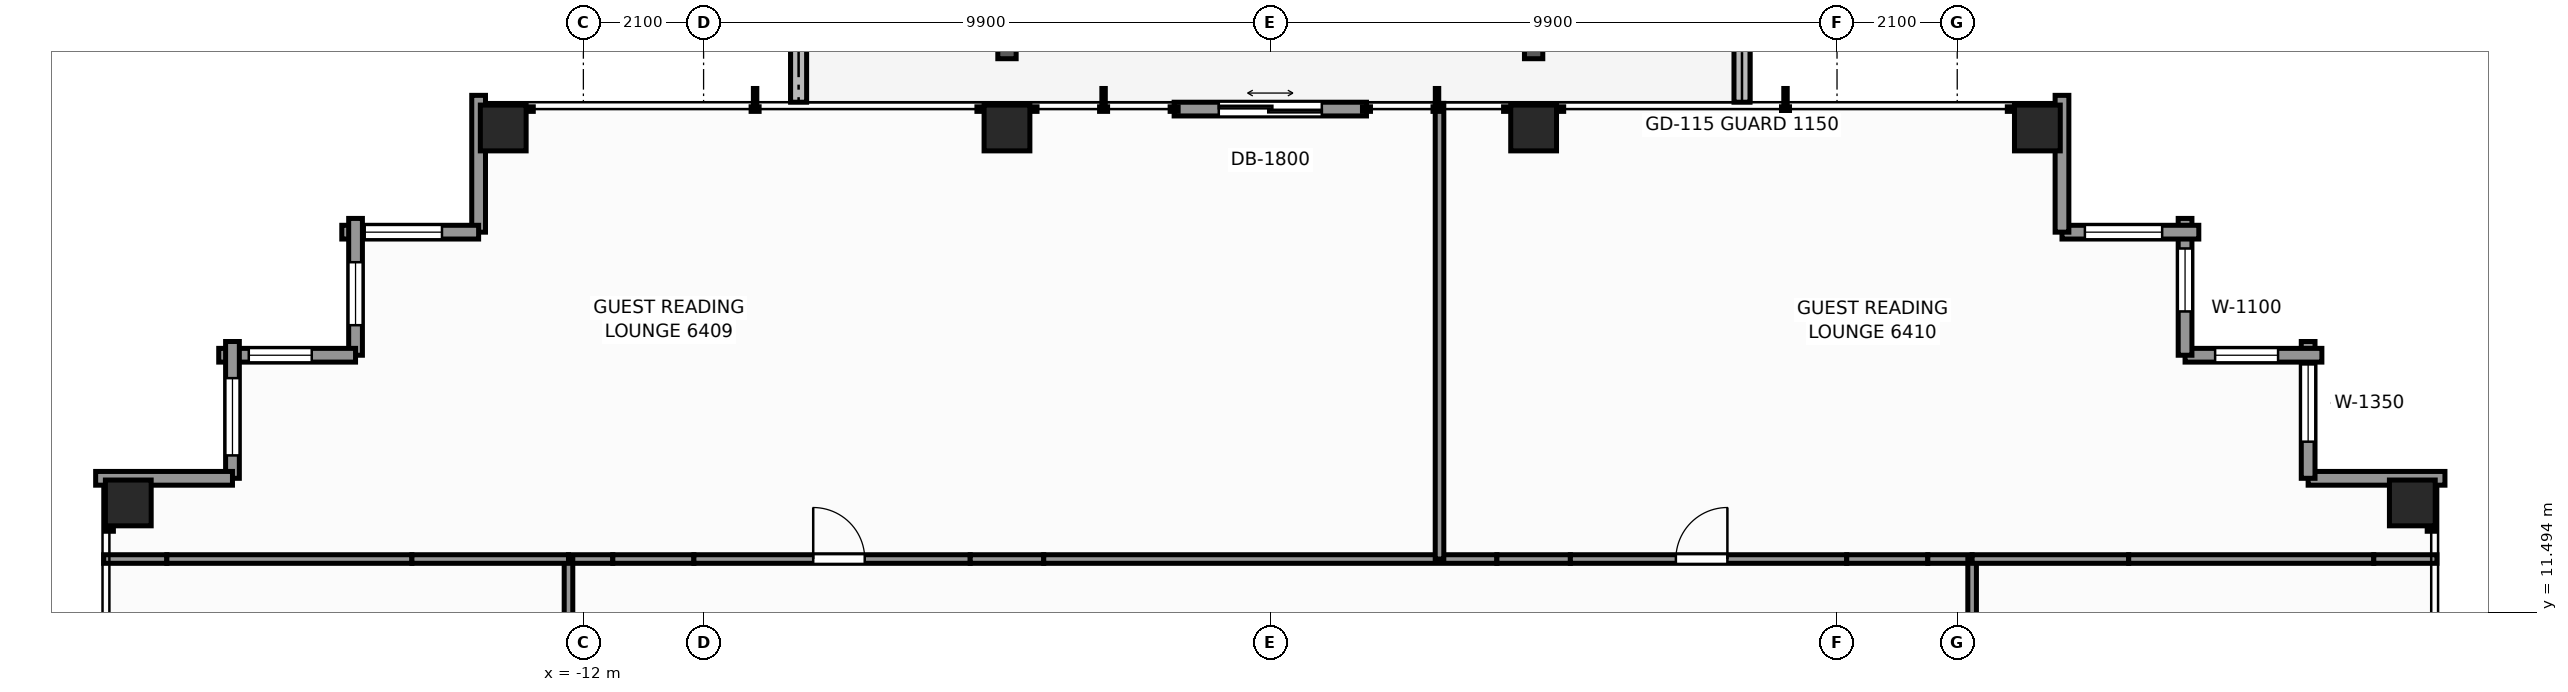
"""IFC4 building model, lengths in metres.
Left out: names, types, materials, properties, quantities, classifications, styles, units other than length and angle.
Written with IfcOpenShell. Run it as: python <this file> out.ifc"""

import sys

from ifc_helpers import new_model, si_unit, direction, frame, frame_2d, origin, origin_2d, place, context, subcontext, project, spatial, rectangle, extrude, element, fill, save


model = new_model("IFC4")
c1 = context("Model", 3, precision=1e-05, world=origin(), true_north=direction((0.0, 1.0)))
c2 = subcontext(c1, "Body", "Model", "MODEL_VIEW")
j1 = project(units=[si_unit("LENGTHUNIT", "METRE"), si_unit("PLANEANGLEUNIT", "RADIAN")], contexts=[c1])
p1 = place(None, origin())
s1 = spatial("IfcSite", under=j1, at=p1, CompositionType="ELEMENT")
p2 = place(p1, origin())
s2 = spatial("IfcBuilding", under=s1, at=p2, CompositionType="ELEMENT")
p3 = place(p2, frame((0.0, 0.0, 219.6)))
s3 = spatial("IfcBuildingStorey", under=s2, at=p3, CompositionType="ELEMENT", Elevation=219.6)
for number, where, z_axis, x_axis in (
    (1, (-13.4, 19.95, 0.0), (0.0, 0.0, 1.0), (1.0, 0.0, 0.0)),
    (2, (-4.6, 19.95, 0.0), (0.0, 0.0, 1.0), (1.0, 0.0, 0.0)),
    (3, (4.6, 19.95, 0.0), (0.0, 0.0, 1.0), (1.0, 0.0, 0.0)),
    (4, (13.4, 19.95, 0.0), (0.0, 0.0, 1.0), (1.0, 0.0, 0.0)),
    (5, (-19.95, 13.4, 0.0), (0.0, 0.0, 1.0), (1.0, 0.0, 0.0)),
    (6, (19.95, 13.4, 0.0), (0.0, 0.0, 1.0), (1.0, 0.0, 0.0)),
):
    element("IfcColumn", number, at=place(p3, frame(where, z_axis=z_axis, x_axis=x_axis)), inside=s3, PredefinedType="COLUMN", context=c2, shape_type="SweptSolid", body=[
        extrude(rectangle(XDim=0.8, YDim=0.8, at=origin_2d()), origin(), (0.0, 0.0, 1.0), 3.3),
    ])
p4 = place(p3, frame((8.24, 20.4, -0.04), z_axis=(0.0, 0.0, 1.0), x_axis=(0.0, 1.0, 0.0)))
e7 = element("IfcWall", 7, at=p4, inside=s3, PredefinedType="PARAPET", context=c2, shape_type="SweptSolid", body=[
    extrude(rectangle(XDim=1.705, YDim=0.28, at=frame_2d((0.853, 0.0))), origin(), (0.0, 0.0, 1.0), 0.42),
])
p5 = place(p3, frame((-8.24, 21.713, -0.04), z_axis=(0.0, 0.0, 1.0), x_axis=(0.0, -1.0, 0.0)))
e8 = element("IfcWall", 8, at=p5, inside=s3, PredefinedType="PARAPET", context=c2, shape_type="SweptSolid", body=[
    extrude(rectangle(XDim=1.313, YDim=0.28, at=frame_2d((0.656, 0.0))), origin(), (0.0, 0.0, 1.0), 0.42),
])
p6 = place(p3, frame((18.13, 13.83, 0.0), z_axis=(0.0, 0.0, 1.0), x_axis=(1.0, 0.0, 0.0)))
e9 = element("IfcWall", 9, at=p6, inside=s3, PredefinedType="STANDARD", context=c2, shape_type="SweptSolid", body=[
    extrude(rectangle(XDim=2.39, YDim=0.24, at=frame_2d((1.195, 0.0))), origin(), (0.0, 0.0, 1.0), 1.275),
])
p7 = place(p3, frame((18.13, 16.22, 0.0), z_axis=(0.0, 0.0, 1.0), x_axis=(0.0, -1.0, 0.0)))
e10 = element("IfcWall", 10, at=p7, inside=s3, PredefinedType="STANDARD", context=c2, shape_type="SweptSolid", body=[
    extrude(rectangle(XDim=2.39, YDim=0.24, at=frame_2d((1.195, 0.0))), origin(), (0.0, 0.0, 1.0), 2.463),
])
p8 = place(p7, frame((0.4, 0.0, 0.65)))
e11 = element("IfcOpeningElement", 11, at=p8, cuts=e10, PredefinedType="OPENING", context=c2, shape_type="SweptSolid", body=[
    extrude(rectangle(XDim=1.35, YDim=1.55, at=frame_2d((0.675, 0.775))), frame((0.0, 0.13, 0.0), z_axis=(0.0, -1.0, 0.0), x_axis=(1.0, 0.0, 0.0)), (0.0, 0.0, 1.0), 0.26),
])
p9 = place(p3, frame((15.98, 15.98, 0.0), z_axis=(0.0, 0.0, 1.0), x_axis=(1.0, 0.0, 0.0)))
e12 = element("IfcWall", 12, at=p9, inside=s3, PredefinedType="STANDARD", context=c2, shape_type="SweptSolid", body=[
    extrude(rectangle(XDim=2.39, YDim=0.24, at=frame_2d((1.195, 0.0))), origin(), (0.0, 0.0, 1.0), 2.463),
])
p10 = place(p9, frame((0.525, 0.0, 0.65)))
e13 = element("IfcOpeningElement", 13, at=p10, cuts=e12, PredefinedType="OPENING", context=c2, shape_type="SweptSolid", body=[
    extrude(rectangle(XDim=1.1, YDim=1.45, at=frame_2d((0.55, 0.725))), frame((0.0, 0.13, 0.0), z_axis=(0.0, -1.0, 0.0), x_axis=(1.0, 0.0, 0.0)), (0.0, 0.0, 1.0), 0.26),
])
p11 = place(p3, frame((15.98, 18.37, 0.0), z_axis=(0.0, 0.0, 1.0), x_axis=(0.0, -1.0, 0.0)))
e14 = element("IfcWall", 14, at=p11, inside=s3, PredefinedType="STANDARD", context=c2, shape_type="SweptSolid", body=[
    extrude(rectangle(XDim=2.39, YDim=0.24, at=frame_2d((1.195, 0.0))), origin(), (0.0, 0.0, 1.0), 2.463),
])
p12 = place(p11, frame((0.525, 0.0, 0.65)))
e15 = element("IfcOpeningElement", 15, at=p12, cuts=e14, PredefinedType="OPENING", context=c2, shape_type="SweptSolid", body=[
    extrude(rectangle(XDim=1.1, YDim=1.45, at=frame_2d((0.55, 0.725))), frame((0.0, 0.13, 0.0), z_axis=(0.0, -1.0, 0.0), x_axis=(1.0, 0.0, 0.0)), (0.0, 0.0, 1.0), 0.26),
])
p13 = place(p3, frame((13.83, 18.13, 0.0), z_axis=(0.0, 0.0, 1.0), x_axis=(1.0, 0.0, 0.0)))
e16 = element("IfcWall", 16, at=p13, inside=s3, PredefinedType="STANDARD", context=c2, shape_type="SweptSolid", body=[
    extrude(rectangle(XDim=2.39, YDim=0.24, at=frame_2d((1.195, 0.0))), origin(), (0.0, 0.0, 1.0), 2.463),
])
p14 = place(p13, frame((0.4, 0.0, 0.65)))
e17 = element("IfcOpeningElement", 17, at=p14, cuts=e16, PredefinedType="OPENING", context=c2, shape_type="SweptSolid", body=[
    extrude(rectangle(XDim=1.35, YDim=1.55, at=frame_2d((0.675, 0.775))), frame((0.0, 0.13, 0.0), z_axis=(0.0, -1.0, 0.0), x_axis=(1.0, 0.0, 0.0)), (0.0, 0.0, 1.0), 0.26),
])
p15 = place(p3, frame((13.83, 20.52, 0.0), z_axis=(0.0, 0.0, 1.0), x_axis=(0.0, -1.0, 0.0)))
e18 = element("IfcWall", 18, at=p15, inside=s3, PredefinedType="STANDARD", context=c2, shape_type="SweptSolid", body=[
    extrude(rectangle(XDim=2.39, YDim=0.24, at=frame_2d((1.195, 0.0))), origin(), (0.0, 0.0, 1.0), 1.275),
])
p16 = place(p3, frame((-1.68, 20.28, 0.0), z_axis=(0.0, 0.0, 1.0), x_axis=(1.0, 0.0, 0.0)))
e19 = element("IfcWall", 19, at=p16, inside=s3, PredefinedType="STANDARD", context=c2, shape_type="SweptSolid", body=[
    extrude(rectangle(XDim=3.36, YDim=0.24, at=frame_2d((1.68, 0.0))), origin(), (0.0, 0.0, 1.0), 3.08),
])
p17 = place(p16, frame((0.78, 0.0, 0.0)))
e20 = element("IfcOpeningElement", 20, at=p17, cuts=e19, PredefinedType="OPENING", context=c2, shape_type="SweptSolid", body=[
    extrude(rectangle(XDim=1.8, YDim=2.2, at=frame_2d((0.9, 1.1))), frame((0.0, 0.13, 0.0), z_axis=(0.0, -1.0, 0.0), x_axis=(1.0, 0.0, 0.0)), (0.0, 0.0, 1.0), 0.26),
])
p18 = place(p3, frame((-13.83, 18.13, 0.0), z_axis=(0.0, 0.0, 1.0), x_axis=(0.0, 1.0, 0.0)))
e21 = element("IfcWall", 21, at=p18, inside=s3, PredefinedType="STANDARD", context=c2, shape_type="SweptSolid", body=[
    extrude(rectangle(XDim=2.39, YDim=0.24, at=frame_2d((1.195, 0.0))), origin(), (0.0, 0.0, 1.0), 1.275),
])
p19 = place(p3, frame((-16.22, 18.13, 0.0), z_axis=(0.0, 0.0, 1.0), x_axis=(1.0, 0.0, 0.0)))
e22 = element("IfcWall", 22, at=p19, inside=s3, PredefinedType="STANDARD", context=c2, shape_type="SweptSolid", body=[
    extrude(rectangle(XDim=2.39, YDim=0.24, at=frame_2d((1.195, 0.0))), origin(), (0.0, 0.0, 1.0), 2.463),
])
p20 = place(p19, frame((0.4, 0.0, 0.65)))
e23 = element("IfcOpeningElement", 23, at=p20, cuts=e22, PredefinedType="OPENING", context=c2, shape_type="SweptSolid", body=[
    extrude(rectangle(XDim=1.35, YDim=1.55, at=frame_2d((0.675, 0.775))), frame((0.0, 0.13, 0.0), z_axis=(0.0, -1.0, 0.0), x_axis=(1.0, 0.0, 0.0)), (0.0, 0.0, 1.0), 0.26),
])
p21 = place(p3, frame((-15.98, 15.98, 0.0), z_axis=(0.0, 0.0, 1.0), x_axis=(0.0, 1.0, 0.0)))
e24 = element("IfcWall", 24, at=p21, inside=s3, PredefinedType="STANDARD", context=c2, shape_type="SweptSolid", body=[
    extrude(rectangle(XDim=2.39, YDim=0.24, at=frame_2d((1.195, 0.0))), origin(), (0.0, 0.0, 1.0), 2.463),
])
p22 = place(p21, frame((0.525, 0.0, 0.65)))
e25 = element("IfcOpeningElement", 25, at=p22, cuts=e24, PredefinedType="OPENING", context=c2, shape_type="SweptSolid", body=[
    extrude(rectangle(XDim=1.1, YDim=1.45, at=frame_2d((0.55, 0.725))), frame((0.0, 0.13, 0.0), z_axis=(0.0, -1.0, 0.0), x_axis=(1.0, 0.0, 0.0)), (0.0, 0.0, 1.0), 0.26),
])
p23 = place(p3, frame((-18.37, 15.98, 0.0), z_axis=(0.0, 0.0, 1.0), x_axis=(1.0, 0.0, 0.0)))
e26 = element("IfcWall", 26, at=p23, inside=s3, PredefinedType="STANDARD", context=c2, shape_type="SweptSolid", body=[
    extrude(rectangle(XDim=2.39, YDim=0.24, at=frame_2d((1.195, 0.0))), origin(), (0.0, 0.0, 1.0), 2.463),
])
p24 = place(p23, frame((0.525, 0.0, 0.65)))
e27 = element("IfcOpeningElement", 27, at=p24, cuts=e26, PredefinedType="OPENING", context=c2, shape_type="SweptSolid", body=[
    extrude(rectangle(XDim=1.1, YDim=1.45, at=frame_2d((0.55, 0.725))), frame((0.0, 0.13, 0.0), z_axis=(0.0, -1.0, 0.0), x_axis=(1.0, 0.0, 0.0)), (0.0, 0.0, 1.0), 0.26),
])
p25 = place(p3, frame((-18.13, 13.83, 0.0), z_axis=(0.0, 0.0, 1.0), x_axis=(0.0, 1.0, 0.0)))
e28 = element("IfcWall", 28, at=p25, inside=s3, PredefinedType="STANDARD", context=c2, shape_type="SweptSolid", body=[
    extrude(rectangle(XDim=2.39, YDim=0.24, at=frame_2d((1.195, 0.0))), origin(), (0.0, 0.0, 1.0), 2.463),
])
p26 = place(p25, frame((0.4, 0.0, 0.65)))
e29 = element("IfcOpeningElement", 29, at=p26, cuts=e28, PredefinedType="OPENING", context=c2, shape_type="SweptSolid", body=[
    extrude(rectangle(XDim=1.35, YDim=1.55, at=frame_2d((0.675, 0.775))), frame((0.0, 0.13, 0.0), z_axis=(0.0, -1.0, 0.0), x_axis=(1.0, 0.0, 0.0)), (0.0, 0.0, 1.0), 0.26),
])
p27 = place(p3, frame((-20.52, 13.83, 0.0), z_axis=(0.0, 0.0, 1.0), x_axis=(1.0, 0.0, 0.0)))
e30 = element("IfcWall", 30, at=p27, inside=s3, PredefinedType="STANDARD", context=c2, shape_type="SweptSolid", body=[
    extrude(rectangle(XDim=2.39, YDim=0.24, at=frame_2d((1.195, 0.0))), origin(), (0.0, 0.0, 1.0), 1.275),
])
p28 = place(p3, frame((-12.26, 12.42, 0.0), z_axis=(0.0, 0.0, 1.0), x_axis=(1.0, 0.0, 0.0)))
e31 = element("IfcWall", 31, at=p28, inside=s3, PredefinedType="PARTITIONING", context=c2, shape_type="SweptSolid", body=[
    extrude(rectangle(XDim=0.774, YDim=0.15, at=frame_2d((0.387, 0.0))), origin(), (0.0, 0.0, 1.0), 3.08),
])
p29 = place(p3, frame((-11.486, 12.42, 0.0), z_axis=(0.0, 0.0, 1.0), x_axis=(1.0, 0.0, 0.0)))
e32 = element("IfcWall", 32, at=p29, inside=s3, PredefinedType="PARTITIONING", context=c2, shape_type="SweptSolid", body=[
    extrude(rectangle(XDim=1.417, YDim=0.15, at=frame_2d((0.708, 0.0))), origin(), (0.0, 0.0, 1.0), 1.265),
])
p30 = place(p3, frame((-10.069, 12.42, 0.0), z_axis=(0.0, 0.0, 1.0), x_axis=(1.0, 0.0, 0.0)))
e33 = element("IfcWall", 33, at=p30, inside=s3, PredefinedType="PARTITIONING", context=c2, shape_type="SweptSolid", body=[
    extrude(rectangle(XDim=4.827, YDim=0.15, at=frame_2d((2.414, 0.0))), origin(), (0.0, 0.0, 1.0), 3.08),
])
p31 = place(p30, frame((2.084, 0.0, 0.0)))
e34 = element("IfcOpeningElement", 34, at=p31, cuts=e33, PredefinedType="OPENING", context=c2, shape_type="SweptSolid", body=[
    extrude(rectangle(XDim=0.9, YDim=2.06, at=frame_2d((0.45, 1.03))), frame((0.0, 0.085, 0.0), z_axis=(0.0, -1.0, 0.0), x_axis=(1.0, 0.0, 0.0)), (0.0, 0.0, 1.0), 0.17),
])
p32 = place(p3, frame((-5.242, 12.42, 0.0), z_axis=(0.0, 0.0, 1.0), x_axis=(1.0, 0.0, 0.0)))
e35 = element("IfcWall", 35, at=p32, inside=s3, PredefinedType="PARTITIONING", context=c2, shape_type="SweptSolid", body=[
    extrude(rectangle(XDim=1.284, YDim=0.15, at=frame_2d((0.642, 0.0))), origin(), (0.0, 0.0, 1.0), 1.265),
])
p33 = place(p3, frame((-3.958, 12.42, 0.0), z_axis=(0.0, 0.0, 1.0), x_axis=(1.0, 0.0, 0.0)))
e36 = element("IfcWall", 36, at=p33, inside=s3, PredefinedType="PARTITIONING", context=c2, shape_type="SweptSolid", body=[
    extrude(rectangle(XDim=7.916, YDim=0.15, at=frame_2d((3.958, 0.0))), origin(), (0.0, 0.0, 1.0), 2.605),
])
p34 = place(p3, frame((3.958, 12.42, 0.0), z_axis=(0.0, 0.0, 1.0), x_axis=(1.0, 0.0, 0.0)))
e37 = element("IfcWall", 37, at=p34, inside=s3, PredefinedType="PARTITIONING", context=c2, shape_type="SweptSolid", body=[
    extrude(rectangle(XDim=1.284, YDim=0.15, at=frame_2d((0.642, 0.0))), origin(), (0.0, 0.0, 1.0), 1.265),
])
p35 = place(p3, frame((5.242, 12.42, 0.0), z_axis=(0.0, 0.0, 1.0), x_axis=(1.0, 0.0, 0.0)))
e38 = element("IfcWall", 38, at=p35, inside=s3, PredefinedType="PARTITIONING", context=c2, shape_type="SweptSolid", body=[
    extrude(rectangle(XDim=4.827, YDim=0.15, at=frame_2d((2.414, 0.0))), origin(), (0.0, 0.0, 1.0), 3.08),
])
p36 = place(p35, frame((1.843, 0.0, 0.0)))
e39 = element("IfcOpeningElement", 39, at=p36, cuts=e38, PredefinedType="OPENING", context=c2, shape_type="SweptSolid", body=[
    extrude(rectangle(XDim=0.9, YDim=2.06, at=frame_2d((0.45, 1.03))), frame((0.0, 0.085, 0.0), z_axis=(0.0, -1.0, 0.0), x_axis=(1.0, 0.0, 0.0)), (0.0, 0.0, 1.0), 0.17),
])
p37 = place(p3, frame((10.069, 12.42, 0.0), z_axis=(0.0, 0.0, 1.0), x_axis=(1.0, 0.0, 0.0)))
e40 = element("IfcWall", 40, at=p37, inside=s3, PredefinedType="PARTITIONING", context=c2, shape_type="SweptSolid", body=[
    extrude(rectangle(XDim=1.417, YDim=0.15, at=frame_2d((0.708, 0.0))), origin(), (0.0, 0.0, 1.0), 1.265),
])
p38 = place(p3, frame((11.486, 12.42, 0.0), z_axis=(0.0, 0.0, 1.0), x_axis=(1.0, 0.0, 0.0)))
e41 = element("IfcWall", 41, at=p38, inside=s3, PredefinedType="PARTITIONING", context=c2, shape_type="SweptSolid", body=[
    extrude(rectangle(XDim=0.774, YDim=0.15, at=frame_2d((0.387, 0.0))), origin(), (0.0, 0.0, 1.0), 3.08),
])
for number, where, z_axis, x_axis in (
    (42, (-12.26, 11.43, 0.0), (0.0, 0.0, 1.0), (0.0, 1.0, 0.0)),
    (43, (12.26, 11.43, 0.0), (0.0, 0.0, 1.0), (0.0, 1.0, 0.0)),
):
    element("IfcWall", number, at=place(p3, frame(where, z_axis=z_axis, x_axis=x_axis)), inside=s3, PredefinedType="PARTITIONING", context=c2, shape_type="SweptSolid", body=[
        extrude(rectangle(XDim=0.99, YDim=0.15, at=frame_2d((0.495, 0.0))), origin(), (0.0, 0.0, 1.0), 3.08),
    ])
p39 = place(p3, frame((-20.38, 12.42, 0.0), z_axis=(0.0, 0.0, 1.0), x_axis=(1.0, 0.0, 0.0)))
e44 = element("IfcWall", 44, at=p39, inside=s3, PredefinedType="PARTITIONING", context=c2, shape_type="SweptSolid", body=[
    extrude(rectangle(XDim=1.103, YDim=0.15, at=frame_2d((0.552, 0.0))), origin(), (0.0, 0.0, 1.0), 2.453),
])
p40 = place(p3, frame((-19.277, 12.42, 0.0), z_axis=(0.0, 0.0, 1.0), x_axis=(1.0, 0.0, 0.0)))
e45 = element("IfcWall", 45, at=p40, inside=s3, PredefinedType="PARTITIONING", context=c2, shape_type="SweptSolid", body=[
    extrude(rectangle(XDim=4.281, YDim=0.15, at=frame_2d((2.141, 0.0))), origin(), (0.0, 0.0, 1.0), 1.265),
])
for number, where, z_axis, x_axis in (
    (46, (-14.995, 12.42, 0.0), (0.0, 0.0, 1.0), (1.0, 0.0, 0.0)),
    (47, (12.26, 12.42, 0.0), (0.0, 0.0, 1.0), (1.0, 0.0, 0.0)),
):
    element("IfcWall", number, at=place(p3, frame(where, z_axis=z_axis, x_axis=x_axis)), inside=s3, PredefinedType="PARTITIONING", context=c2, shape_type="SweptSolid", body=[
        extrude(rectangle(XDim=2.735, YDim=0.15, at=frame_2d((1.368, 0.0))), origin(), (0.0, 0.0, 1.0), 3.08),
    ])
p41 = place(p3, frame((14.995, 12.42, 0.0), z_axis=(0.0, 0.0, 1.0), x_axis=(1.0, 0.0, 0.0)))
e48 = element("IfcWall", 48, at=p41, inside=s3, PredefinedType="PARTITIONING", context=c2, shape_type="SweptSolid", body=[
    extrude(rectangle(XDim=4.281, YDim=0.15, at=frame_2d((2.141, 0.0))), origin(), (0.0, 0.0, 1.0), 1.265),
])
p42 = place(p3, frame((19.277, 12.42, 0.0), z_axis=(0.0, 0.0, 1.0), x_axis=(1.0, 0.0, 0.0)))
e49 = element("IfcWall", 49, at=p42, inside=s3, PredefinedType="PARTITIONING", context=c2, shape_type="SweptSolid", body=[
    extrude(rectangle(XDim=1.103, YDim=0.15, at=frame_2d((0.552, 0.0))), origin(), (0.0, 0.0, 1.0), 2.453),
])
p43 = place(p3, frame((2.956, 12.42, 0.0), z_axis=(0.0, 0.0, 1.0), x_axis=(0.0, 1.0, 0.0)))
e50 = element("IfcWall", 50, at=p43, inside=s3, PredefinedType="PARTITIONING", context=c2, shape_type="SweptSolid", body=[
    extrude(rectangle(XDim=7.96, YDim=0.15, at=frame_2d((3.98, 0.0))), origin(), (0.0, 0.0, 1.0), 2.453),
])
p44 = place(p8, origin())
e51 = element("IfcWindow", 51, at=p44, inside=s3, PartitioningType="SINGLE_PANEL", PredefinedType="WINDOW", context=c2, shape_type="SweptSolid", body=[
    extrude(rectangle(XDim=1.35, YDim=1.55, at=frame_2d((0.675, 0.775))), frame((0.0, 0.03, 0.0), z_axis=(0.0, -1.0, 0.0), x_axis=(1.0, 0.0, 0.0)), (0.0, 0.0, 1.0), 0.06),
])
fill(e11, e51)
p45 = place(p10, origin())
e52 = element("IfcWindow", 52, at=p45, inside=s3, PartitioningType="SINGLE_PANEL", PredefinedType="WINDOW", context=c2, shape_type="SweptSolid", body=[
    extrude(rectangle(XDim=1.1, YDim=1.45, at=frame_2d((0.55, 0.725))), frame((0.0, 0.03, 0.0), z_axis=(0.0, -1.0, 0.0), x_axis=(1.0, 0.0, 0.0)), (0.0, 0.0, 1.0), 0.06),
])
fill(e13, e52)
p46 = place(p12, origin())
e53 = element("IfcWindow", 53, at=p46, inside=s3, PartitioningType="SINGLE_PANEL", PredefinedType="WINDOW", context=c2, shape_type="SweptSolid", body=[
    extrude(rectangle(XDim=1.1, YDim=1.45, at=frame_2d((0.55, 0.725))), frame((0.0, 0.03, 0.0), z_axis=(0.0, -1.0, 0.0), x_axis=(1.0, 0.0, 0.0)), (0.0, 0.0, 1.0), 0.06),
])
fill(e15, e53)
p47 = place(p14, origin())
e54 = element("IfcWindow", 54, at=p47, inside=s3, PartitioningType="SINGLE_PANEL", PredefinedType="WINDOW", context=c2, shape_type="SweptSolid", body=[
    extrude(rectangle(XDim=1.35, YDim=1.55, at=frame_2d((0.675, 0.775))), frame((0.0, 0.03, 0.0), z_axis=(0.0, -1.0, 0.0), x_axis=(1.0, 0.0, 0.0)), (0.0, 0.0, 1.0), 0.06),
])
fill(e17, e54)
p48 = place(p17, origin())
e55 = element("IfcDoor", 55, at=p48, inside=s3, OperationType="DOUBLE_DOOR_SLIDING", PredefinedType="DOOR", context=c2, shape_type="SweptSolid", body=[
    extrude(rectangle(XDim=1.8, YDim=2.2, at=frame_2d((0.9, 1.1))), frame((0.0, 0.025, 0.0), z_axis=(0.0, -1.0, 0.0), x_axis=(1.0, 0.0, 0.0)), (0.0, 0.0, 1.0), 0.05),
])
fill(e20, e55)
p49 = place(p20, origin())
e56 = element("IfcWindow", 56, at=p49, inside=s3, PartitioningType="SINGLE_PANEL", PredefinedType="WINDOW", context=c2, shape_type="SweptSolid", body=[
    extrude(rectangle(XDim=1.35, YDim=1.55, at=frame_2d((0.675, 0.775))), frame((0.0, 0.03, 0.0), z_axis=(0.0, -1.0, 0.0), x_axis=(1.0, 0.0, 0.0)), (0.0, 0.0, 1.0), 0.06),
])
fill(e23, e56)
p50 = place(p22, origin())
e57 = element("IfcWindow", 57, at=p50, inside=s3, PartitioningType="SINGLE_PANEL", PredefinedType="WINDOW", context=c2, shape_type="SweptSolid", body=[
    extrude(rectangle(XDim=1.1, YDim=1.45, at=frame_2d((0.55, 0.725))), frame((0.0, 0.03, 0.0), z_axis=(0.0, -1.0, 0.0), x_axis=(1.0, 0.0, 0.0)), (0.0, 0.0, 1.0), 0.06),
])
fill(e25, e57)
p51 = place(p24, origin())
e58 = element("IfcWindow", 58, at=p51, inside=s3, PartitioningType="SINGLE_PANEL", PredefinedType="WINDOW", context=c2, shape_type="SweptSolid", body=[
    extrude(rectangle(XDim=1.1, YDim=1.45, at=frame_2d((0.55, 0.725))), frame((0.0, 0.03, 0.0), z_axis=(0.0, -1.0, 0.0), x_axis=(1.0, 0.0, 0.0)), (0.0, 0.0, 1.0), 0.06),
])
fill(e27, e58)
p52 = place(p26, origin())
e59 = element("IfcWindow", 59, at=p52, inside=s3, PartitioningType="SINGLE_PANEL", PredefinedType="WINDOW", context=c2, shape_type="SweptSolid", body=[
    extrude(rectangle(XDim=1.35, YDim=1.55, at=frame_2d((0.675, 0.775))), frame((0.0, 0.03, 0.0), z_axis=(0.0, -1.0, 0.0), x_axis=(1.0, 0.0, 0.0)), (0.0, 0.0, 1.0), 0.06),
])
fill(e29, e59)
p53 = place(p31, origin())
e60 = element("IfcDoor", 60, at=p53, inside=s3, OperationType="SINGLE_SWING_LEFT", PredefinedType="DOOR", context=c2, shape_type="SweptSolid", body=[
    extrude(rectangle(XDim=0.9, YDim=2.06, at=frame_2d((0.45, 1.03))), frame((0.0, 0.025, 0.0), z_axis=(0.0, -1.0, 0.0), x_axis=(1.0, 0.0, 0.0)), (0.0, 0.0, 1.0), 0.05),
])
fill(e34, e60)
p54 = place(p36, origin())
e61 = element("IfcDoor", 61, at=p54, inside=s3, OperationType="SINGLE_SWING_RIGHT", PredefinedType="DOOR", context=c2, shape_type="SweptSolid", body=[
    extrude(rectangle(XDim=0.9, YDim=2.06, at=frame_2d((0.45, 1.03))), frame((0.0, 0.025, 0.0), z_axis=(0.0, -1.0, 0.0), x_axis=(1.0, 0.0, 0.0)), (0.0, 0.0, 1.0), 0.05),
])
fill(e39, e61)
save(model, sys.argv[1])
